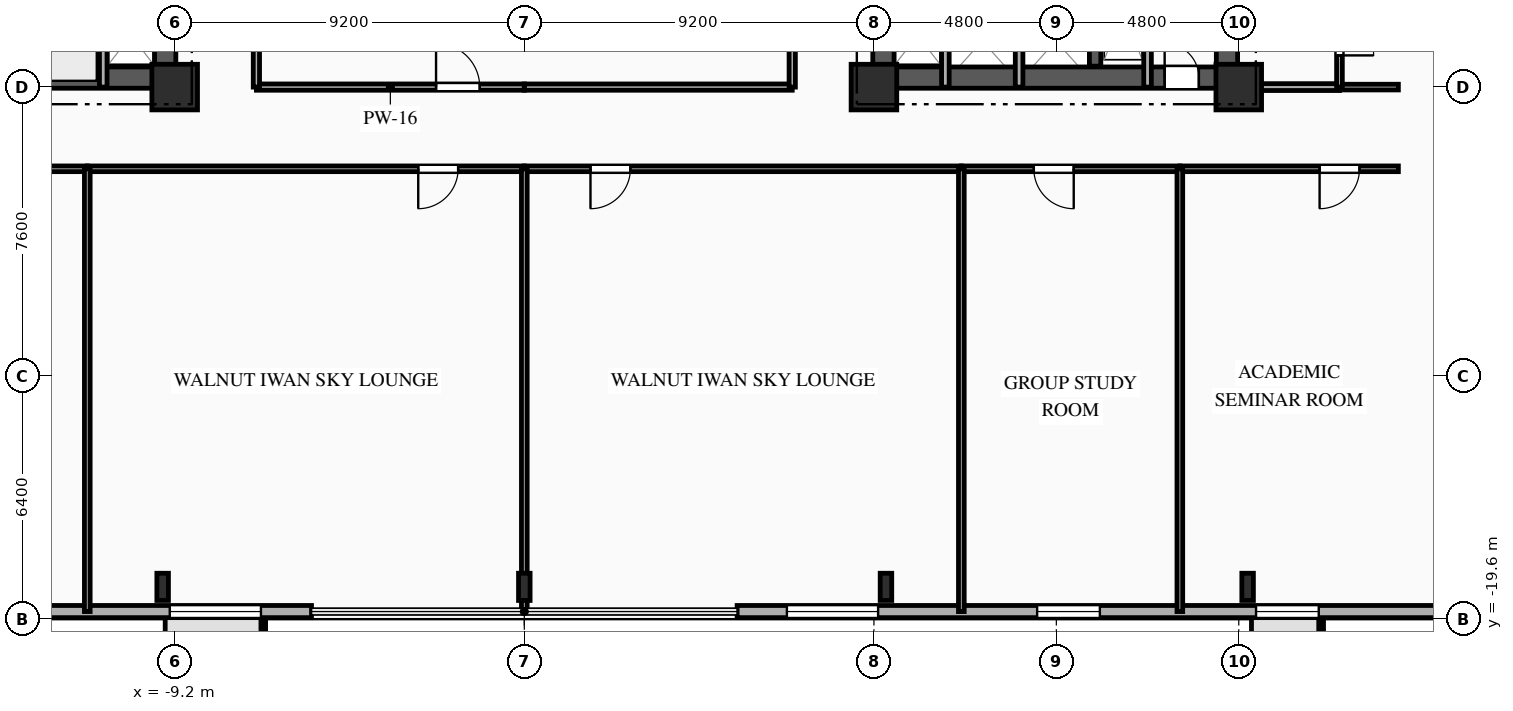
"""IFC4 building model, lengths in metres.
Left out: names, types, materials, properties, quantities, classifications, styles, units other than length and angle.
Written with IfcOpenShell. Run it as: python <this file> out.ifc"""

import sys

from ifc_helpers import new_model, si_unit, direction, frame, frame_2d, origin, origin_2d, place, context, subcontext, project, spatial, rectangle, i_section, extrude, element, fill, save


model = new_model("IFC4")
c1 = context("Model", 3, precision=1e-05, world=origin(), true_north=direction((0.0, 1.0)))
c2 = subcontext(c1, "Body", "Model", "MODEL_VIEW")
j1 = project(units=[si_unit("LENGTHUNIT", "METRE"), si_unit("PLANEANGLEUNIT", "RADIAN")], contexts=[c1])
p1 = place(None, origin())
s1 = spatial("IfcSite", under=j1, at=p1, CompositionType="ELEMENT")
p2 = place(p1, origin())
s2 = spatial("IfcBuilding", under=s1, at=p2, CompositionType="ELEMENT")
p3 = place(p2, frame((0.0, 0.0, 50.45)))
s3 = spatial("IfcBuildingStorey", under=s2, at=p3, CompositionType="ELEMENT", Elevation=50.45)
for number, where, z_axis, x_axis in (
    (1, (-9.2, -5.6, 0.0), (0.0, 0.0, 1.0), (1.0, 0.0, 0.0)),
    (2, (9.2, -5.6, 0.0), (0.0, 0.0, 1.0), (1.0, 0.0, 0.0)),
    (3, (18.8, -5.6, 0.0), (0.0, 0.0, 1.0), (1.0, 0.0, 0.0)),
):
    element("IfcColumn", number, at=place(p3, frame(where, z_axis=z_axis, x_axis=x_axis)), inside=s3, PredefinedType="COLUMN", context=c2, shape_type="SweptSolid", body=[
        extrude(rectangle(XDim=1.2, YDim=1.2, at=origin_2d()), origin(), (0.0, 0.0, 1.0), 3.35),
    ])
for number, where, z_axis, x_axis in (
    (4, (-9.517, -18.75, 0.0), (0.0, 0.0, 1.0), (1.0, 0.0, 0.0)),
    (5, (0.0, -18.75, 0.0), (0.0, 0.0, 1.0), (1.0, 0.0, 0.0)),
    (6, (9.517, -18.75, 0.0), (0.0, 0.0, 1.0), (1.0, 0.0, 0.0)),
    (7, (19.033, -18.75, 0.0), (0.0, 0.0, 1.0), (1.0, 0.0, 0.0)),
):
    element("IfcColumn", number, at=place(p3, frame(where, z_axis=z_axis, x_axis=x_axis)), inside=s3, PredefinedType="COLUMN", context=c2, shape_type="SweptSolid", body=[
        extrude(i_section(OverallWidth=0.304, OverallDepth=0.716, WebThickness=0.021, FlangeThickness=0.04, FilletRadius=0.027, at=origin_2d()), origin(), (0.0, 0.0, 1.0), 3.35),
    ])
p4 = place(p3, frame((29.2, -19.4, 0.0), z_axis=(0.0, 0.0, 1.0), x_axis=(-1.0, 0.0, 0.0)))
e8 = element("IfcWall", 8, at=p4, inside=s3, PredefinedType="SOLIDWALL", context=c2, shape_type="SweptSolid", body=[
    extrude(rectangle(XDim=23.6, YDim=0.32, at=frame_2d((11.8, 0.0))), origin(), (0.0, 0.0, 1.0), 3.035),
])
p5 = place(p4, frame((8.295, 0.0, 0.85)))
e9 = element("IfcOpeningElement", 9, at=p5, cuts=e8, PredefinedType="OPENING", context=c2, shape_type="SweptSolid", body=[
    extrude(rectangle(XDim=1.65, YDim=1.85, at=frame_2d((0.825, 0.925))), frame((0.0, 0.17, 0.0), z_axis=(0.0, -1.0, 0.0), x_axis=(1.0, 0.0, 0.0)), (0.0, 0.0, 1.0), 0.34),
])
p6 = place(p4, frame((14.055, 0.0, 0.85)))
e10 = element("IfcOpeningElement", 10, at=p6, cuts=e8, PredefinedType="OPENING", context=c2, shape_type="SweptSolid", body=[
    extrude(rectangle(XDim=1.65, YDim=1.85, at=frame_2d((0.825, 0.925))), frame((0.0, 0.17, 0.0), z_axis=(0.0, -1.0, 0.0), x_axis=(1.0, 0.0, 0.0)), (0.0, 0.0, 1.0), 0.34),
])
p7 = place(p4, frame((19.89, 0.0, 0.85)))
e11 = element("IfcOpeningElement", 11, at=p7, cuts=e8, PredefinedType="OPENING", context=c2, shape_type="SweptSolid", body=[
    extrude(rectangle(XDim=2.4, YDim=1.95, at=frame_2d((1.2, 0.975))), frame((0.0, 0.17, 0.0), z_axis=(0.0, -1.0, 0.0), x_axis=(1.0, 0.0, 0.0)), (0.0, 0.0, 1.0), 0.34),
])
p8 = place(p3, frame((-5.6, -19.4, 0.0), z_axis=(0.0, 0.0, 1.0), x_axis=(-1.0, 0.0, 0.0)))
e12 = element("IfcWall", 12, at=p8, inside=s3, PredefinedType="SOLIDWALL", context=c2, shape_type="SweptSolid", body=[
    extrude(rectangle(XDim=23.6, YDim=0.32, at=frame_2d((11.8, 0.0))), origin(), (0.0, 0.0, 1.0), 3.035),
])
p9 = place(p8, frame((1.33, 0.0, 0.85)))
e13 = element("IfcOpeningElement", 13, at=p9, cuts=e12, PredefinedType="OPENING", context=c2, shape_type="SweptSolid", body=[
    extrude(rectangle(XDim=2.4, YDim=1.95, at=frame_2d((1.2, 0.975))), frame((0.0, 0.17, 0.0), z_axis=(0.0, -1.0, 0.0), x_axis=(1.0, 0.0, 0.0)), (0.0, 0.0, 1.0), 0.34),
])
p10 = place(p8, frame((7.975, 0.0, 0.85)))
e14 = element("IfcOpeningElement", 14, at=p10, cuts=e12, PredefinedType="OPENING", context=c2, shape_type="SweptSolid", body=[
    extrude(rectangle(XDim=1.65, YDim=1.85, at=frame_2d((0.825, 0.925))), frame((0.0, 0.17, 0.0), z_axis=(0.0, -1.0, 0.0), x_axis=(1.0, 0.0, 0.0)), (0.0, 0.0, 1.0), 0.34),
])
p11 = place(p8, frame((13.735, 0.0, 0.85)))
e15 = element("IfcOpeningElement", 15, at=p11, cuts=e12, PredefinedType="OPENING", context=c2, shape_type="SweptSolid", body=[
    extrude(rectangle(XDim=1.65, YDim=1.85, at=frame_2d((0.825, 0.925))), frame((0.0, 0.17, 0.0), z_axis=(0.0, -1.0, 0.0), x_axis=(1.0, 0.0, 0.0)), (0.0, 0.0, 1.0), 0.34),
])
p12 = place(p3, frame((-18.8, -5.35, 0.0), z_axis=(0.0, 0.0, 1.0), x_axis=(1.0, 0.0, 0.0)))
e16 = element("IfcWall", 16, at=p12, inside=s3, PredefinedType="SHEAR", context=c2, shape_type="SweptSolid", body=[
    extrude(rectangle(XDim=9.6, YDim=0.56, at=frame_2d((4.8, 0.0))), origin(), (0.0, 0.0, 1.0), 3.035),
])
p13 = place(p12, frame((1.05, 0.0, 0.0)))
e17 = element("IfcOpeningElement", 17, at=p13, cuts=e16, PredefinedType="OPENING", context=c2, shape_type="SweptSolid", body=[
    extrude(rectangle(XDim=0.9, YDim=2.1, at=frame_2d((0.45, 1.05))), frame((0.0, 0.29, 0.0), z_axis=(0.0, -1.0, 0.0), x_axis=(1.0, 0.0, 0.0)), (0.0, 0.0, 1.0), 0.58),
])
p14 = place(p3, frame((-9.45, -5.05, 0.0), z_axis=(0.0, 0.0, 1.0), x_axis=(0.0, 1.0, 0.0)))
e18 = element("IfcWall", 18, at=p14, inside=s3, PredefinedType="SHEAR", context=c2, shape_type="SweptSolid", body=[
    extrude(rectangle(XDim=10.1, YDim=0.56, at=frame_2d((5.05, 0.0))), origin(), (0.0, 0.0, 1.0), 3.035),
])
p15 = place(p14, frame((7.15, 0.0, 0.0)))
e19 = element("IfcOpeningElement", 19, at=p15, cuts=e18, PredefinedType="OPENING", context=c2, shape_type="SweptSolid", body=[
    extrude(rectangle(XDim=0.9, YDim=2.1, at=frame_2d((0.45, 1.05))), frame((0.0, 0.29, 0.0), z_axis=(0.0, -1.0, 0.0), x_axis=(1.0, 0.0, 0.0)), (0.0, 0.0, 1.0), 0.58),
])
p16 = place(p14, frame((2.4, 0.0, 0.0)))
e20 = element("IfcOpeningElement", 20, at=p16, cuts=e18, PredefinedType="OPENING", context=c2, shape_type="SweptSolid", body=[
    extrude(rectangle(XDim=1.2, YDim=2.15, at=frame_2d((0.6, 1.075))), frame((0.0, 0.29, 0.0), z_axis=(0.0, -1.0, 0.0), x_axis=(1.0, 0.0, 0.0)), (0.0, 0.0, 1.0), 0.58),
])
p17 = place(p3, frame((9.2, -5.35, 0.0), z_axis=(0.0, 0.0, 1.0), x_axis=(1.0, 0.0, 0.0)))
e21 = element("IfcWall", 21, at=p17, inside=s3, PredefinedType="SHEAR", context=c2, shape_type="SweptSolid", body=[
    extrude(rectangle(XDim=9.6, YDim=0.56, at=frame_2d((4.8, 0.0))), origin(), (0.0, 0.0, 1.0), 3.035),
])
p18 = place(p17, frame((7.65, 0.0, 0.0)))
e22 = element("IfcOpeningElement", 22, at=p18, cuts=e21, PredefinedType="OPENING", context=c2, shape_type="SweptSolid", body=[
    extrude(rectangle(XDim=0.9, YDim=2.1, at=frame_2d((0.45, 1.05))), frame((0.0, 0.29, 0.0), z_axis=(0.0, -1.0, 0.0), x_axis=(1.0, 0.0, 0.0)), (0.0, 0.0, 1.0), 0.58),
])
p19 = place(p3, frame((9.45, -5.05, 0.0), z_axis=(0.0, 0.0, 1.0), x_axis=(0.0, 1.0, 0.0)))
e23 = element("IfcWall", 23, at=p19, inside=s3, PredefinedType="SHEAR", context=c2, shape_type="SweptSolid", body=[
    extrude(rectangle(XDim=10.1, YDim=0.56, at=frame_2d((5.05, 0.0))), origin(), (0.0, 0.0, 1.0), 3.035),
])
p20 = place(p19, frame((7.15, 0.0, 0.0)))
e24 = element("IfcOpeningElement", 24, at=p20, cuts=e23, PredefinedType="OPENING", context=c2, shape_type="SweptSolid", body=[
    extrude(rectangle(XDim=0.9, YDim=2.1, at=frame_2d((0.45, 1.05))), frame((0.0, 0.29, 0.0), z_axis=(0.0, -1.0, 0.0), x_axis=(1.0, 0.0, 0.0)), (0.0, 0.0, 1.0), 0.58),
])
p21 = place(p19, frame((2.4, 0.0, 0.0)))
e25 = element("IfcOpeningElement", 25, at=p21, cuts=e23, PredefinedType="OPENING", context=c2, shape_type="SweptSolid", body=[
    extrude(rectangle(XDim=1.2, YDim=2.15, at=frame_2d((0.6, 1.075))), frame((0.0, 0.29, 0.0), z_axis=(0.0, -1.0, 0.0), x_axis=(1.0, 0.0, 0.0)), (0.0, 0.0, 1.0), 0.58),
])
p22 = place(p3, frame((18.49, -5.05, 0.0), z_axis=(0.0, 0.0, 1.0), x_axis=(0.0, 1.0, 0.0)))
e26 = element("IfcWall", 26, at=p22, inside=s3, PredefinedType="SHEAR", context=c2, shape_type="SweptSolid", body=[
    extrude(rectangle(XDim=10.1, YDim=0.56, at=frame_2d((5.05, 0.0))), origin(), (0.0, 0.0, 1.0), 3.035),
])
p23 = place(p3, frame((15.02, -5.05, 0.0), z_axis=(0.0, 0.0, 1.0), x_axis=(0.0, 1.0, 0.0)))
e27 = element("IfcWall", 27, at=p23, inside=s3, PredefinedType="SHEAR", context=c2, shape_type="SweptSolid", body=[
    extrude(rectangle(XDim=10.1, YDim=0.3, at=frame_2d((5.05, 0.0))), origin(), (0.0, 0.0, 1.0), 3.035),
])
p24 = place(p3, frame((-11.08, -5.6, 0.0), z_axis=(0.0, 0.0, 1.0), x_axis=(0.0, 1.0, 0.0)))
e28 = element("IfcWall", 28, at=p24, inside=s3, PredefinedType="PARTITIONING", context=c2, shape_type="SweptSolid", body=[
    extrude(rectangle(XDim=2.25, YDim=0.2, at=frame_2d((1.125, 0.0))), origin(), (0.0, 0.0, 1.0), 3.035),
])
p25 = place(p3, frame((16.4, -2.11, 0.0), z_axis=(0.0, 0.0, 1.0), x_axis=(0.0, -1.0, 0.0)))
e29 = element("IfcWall", 29, at=p25, inside=s3, PredefinedType="PARTITIONING", context=c2, shape_type="SweptSolid", body=[
    extrude(rectangle(XDim=3.49, YDim=0.2, at=frame_2d((1.745, 0.0))), origin(), (0.0, 0.0, 1.0), 3.035),
])
for number, where, z_axis, x_axis in (
    (30, (11.08, -5.6, 0.0), (0.0, 0.0, 1.0), (0.0, 1.0, 0.0)),
    (31, (13.02, -5.6, 0.0), (0.0, 0.0, 1.0), (0.0, 1.0, 0.0)),
):
    element("IfcWall", number, at=place(p3, frame(where, z_axis=z_axis, x_axis=x_axis)), inside=s3, PredefinedType="PARTITIONING", context=c2, shape_type="SweptSolid", body=[
        extrude(rectangle(XDim=2.25, YDim=0.2, at=frame_2d((1.125, 0.0))), origin(), (0.0, 0.0, 1.0), 3.035),
    ])
p26 = place(p3, frame((-11.5, -7.75, 0.0), z_axis=(0.0, 0.0, 1.0), x_axis=(-1.0, 0.0, 0.0)))
e32 = element("IfcWall", 32, at=p26, inside=s3, PredefinedType="PARTITIONING", context=c2, shape_type="SweptSolid", body=[
    extrude(rectangle(XDim=5.75, YDim=0.15, at=frame_2d((2.875, 0.0))), origin(), (0.0, 0.0, 1.0), 3.035),
])
p27 = place(p26, frame((1.907, 0.0, 0.0)))
e33 = element("IfcOpeningElement", 33, at=p27, cuts=e32, PredefinedType="OPENING", context=c2, shape_type="SweptSolid", body=[
    extrude(rectangle(XDim=1.05, YDim=2.15, at=frame_2d((0.525, 1.075))), frame((0.0, 0.085, 0.0), z_axis=(0.0, -1.0, 0.0), x_axis=(1.0, 0.0, 0.0)), (0.0, 0.0, 1.0), 0.17),
])
p28 = place(p3, frame((0.0, -7.75, 0.0), z_axis=(0.0, 0.0, 1.0), x_axis=(-1.0, 0.0, 0.0)))
e34 = element("IfcWall", 34, at=p28, inside=s3, PredefinedType="PARTITIONING", context=c2, shape_type="SweptSolid", body=[
    extrude(rectangle(XDim=11.5, YDim=0.15, at=frame_2d((5.75, 0.0))), origin(), (0.0, 0.0, 1.0), 3.035),
])
p29 = place(p28, frame((1.741, 0.0, 0.0)))
e35 = element("IfcOpeningElement", 35, at=p29, cuts=e34, PredefinedType="OPENING", context=c2, shape_type="SweptSolid", body=[
    extrude(rectangle(XDim=1.05, YDim=2.15, at=frame_2d((0.525, 1.075))), frame((0.0, 0.085, 0.0), z_axis=(0.0, -1.0, 0.0), x_axis=(1.0, 0.0, 0.0)), (0.0, 0.0, 1.0), 0.17),
])
p30 = place(p3, frame((-7.05, -5.6, 0.0), z_axis=(0.0, 0.0, 1.0), x_axis=(1.0, 0.0, 0.0)))
e36 = element("IfcWall", 36, at=p30, inside=s3, PredefinedType="PARTITIONING", context=c2, shape_type="SweptSolid", body=[
    extrude(rectangle(XDim=7.05, YDim=0.165, at=frame_2d((3.525, 0.0))), origin(), (0.0, 0.0, 1.0), 2.52),
])
p31 = place(p30, frame((4.728, 0.0, 0.0)))
e37 = element("IfcOpeningElement", 37, at=p31, cuts=e36, PredefinedType="OPENING", context=c2, shape_type="SweptSolid", body=[
    extrude(rectangle(XDim=1.15, YDim=2.15, at=frame_2d((0.575, 1.075))), frame((0.0, 0.093, 0.0), z_axis=(0.0, -1.0, 0.0), x_axis=(1.0, 0.0, 0.0)), (0.0, 0.0, 1.0), 0.185),
])
p32 = place(p3, frame((18.8, -5.6, 0.0), z_axis=(0.0, 0.0, 1.0), x_axis=(1.0, 0.0, 0.0)))
e38 = element("IfcWall", 38, at=p32, inside=s3, PredefinedType="PARTITIONING", context=c2, shape_type="SweptSolid", body=[
    extrude(rectangle(XDim=2.65, YDim=0.18, at=frame_2d((1.325, 0.0))), origin(), (0.0, 0.0, 1.0), 3.035),
])
p33 = place(p3, frame((21.45, -5.6, 0.0), z_axis=(0.0, 0.0, 1.0), x_axis=(1.0, 0.0, 0.0)))
e39 = element("IfcWall", 39, at=p33, inside=s3, PredefinedType="PLUMBINGWALL", context=c2, shape_type="SweptSolid", body=[
    extrude(rectangle(XDim=1.55, YDim=0.15, at=frame_2d((0.775, 0.0))), origin(), (0.0, 0.0, 1.0), 3.035),
])
p34 = place(p3, frame((11.5, -7.75, 0.0), z_axis=(0.0, 0.0, 1.0), x_axis=(-1.0, 0.0, 0.0)))
e40 = element("IfcWall", 40, at=p34, inside=s3, PredefinedType="PARTITIONING", context=c2, shape_type="SweptSolid", body=[
    extrude(rectangle(XDim=11.5, YDim=0.15, at=frame_2d((5.75, 0.0))), origin(), (0.0, 0.0, 1.0), 3.035),
])
p35 = place(p34, frame((8.709, 0.0, 0.0)))
e41 = element("IfcOpeningElement", 41, at=p35, cuts=e40, PredefinedType="OPENING", context=c2, shape_type="SweptSolid", body=[
    extrude(rectangle(XDim=1.05, YDim=2.15, at=frame_2d((0.525, 1.075))), frame((0.0, 0.085, 0.0), z_axis=(0.0, -1.0, 0.0), x_axis=(1.0, 0.0, 0.0)), (0.0, 0.0, 1.0), 0.17),
])
p36 = place(p3, frame((17.25, -7.75, 0.0), z_axis=(0.0, 0.0, 1.0), x_axis=(-1.0, 0.0, 0.0)))
e42 = element("IfcWall", 42, at=p36, inside=s3, PredefinedType="PARTITIONING", context=c2, shape_type="SweptSolid", body=[
    extrude(rectangle(XDim=5.75, YDim=0.15, at=frame_2d((2.875, 0.0))), origin(), (0.0, 0.0, 1.0), 3.035),
])
p37 = place(p36, frame((2.792, 0.0, 0.0)))
e43 = element("IfcOpeningElement", 43, at=p37, cuts=e42, PredefinedType="OPENING", context=c2, shape_type="SweptSolid", body=[
    extrude(rectangle(XDim=1.05, YDim=2.15, at=frame_2d((0.525, 1.075))), frame((0.0, 0.085, 0.0), z_axis=(0.0, -1.0, 0.0), x_axis=(1.0, 0.0, 0.0)), (0.0, 0.0, 1.0), 0.17),
])
p38 = place(p3, frame((23.0, -7.75, 0.0), z_axis=(0.0, 0.0, 1.0), x_axis=(-1.0, 0.0, 0.0)))
e44 = element("IfcWall", 44, at=p38, inside=s3, PredefinedType="PARTITIONING", context=c2, shape_type="SweptSolid", body=[
    extrude(rectangle(XDim=5.75, YDim=0.15, at=frame_2d((2.875, 0.0))), origin(), (0.0, 0.0, 1.0), 3.035),
])
p39 = place(p38, frame((1.022, 0.0, 0.0)))
e45 = element("IfcOpeningElement", 45, at=p39, cuts=e44, PredefinedType="OPENING", context=c2, shape_type="SweptSolid", body=[
    extrude(rectangle(XDim=1.05, YDim=2.15, at=frame_2d((0.525, 1.075))), frame((0.0, 0.085, 0.0), z_axis=(0.0, -1.0, 0.0), x_axis=(1.0, 0.0, 0.0)), (0.0, 0.0, 1.0), 0.17),
])
p40 = place(p3, frame((0.0, -5.6, 0.0), z_axis=(0.0, 0.0, 1.0), x_axis=(1.0, 0.0, 0.0)))
e46 = element("IfcWall", 46, at=p40, inside=s3, PredefinedType="PARTITIONING", context=c2, shape_type="SweptSolid", body=[
    extrude(rectangle(XDim=7.05, YDim=0.165, at=frame_2d((3.525, 0.0))), origin(), (0.0, 0.0, 1.0), 2.52),
])
for number, where, z_axis, x_axis in (
    (47, (-7.05, 1.45, 0.0), (0.0, 0.0, 1.0), (0.0, -1.0, 0.0)),
    (48, (7.05, -5.6, 0.0), (0.0, 0.0, 1.0), (0.0, 1.0, 0.0)),
):
    element("IfcWall", number, at=place(p3, frame(where, z_axis=z_axis, x_axis=x_axis)), inside=s3, PredefinedType="PARTITIONING", context=c2, shape_type="SweptSolid", body=[
        extrude(rectangle(XDim=7.05, YDim=0.165, at=frame_2d((3.525, 0.0))), origin(), (0.0, 0.0, 1.0), 3.035),
    ])
p41 = place(p3, frame((21.45, -3.25, 0.0), z_axis=(0.0, 0.0, 1.0), x_axis=(0.0, -1.0, 0.0)))
e49 = element("IfcWall", 49, at=p41, inside=s3, PredefinedType="PLUMBINGWALL", context=c2, shape_type="SweptSolid", body=[
    extrude(rectangle(XDim=2.35, YDim=0.15, at=frame_2d((1.175, 0.0))), origin(), (0.0, 0.0, 1.0), 3.035),
])
p42 = place(p41, frame((0.616, 0.0, 0.0)))
e50 = element("IfcOpeningElement", 50, at=p42, cuts=e49, PredefinedType="OPENING", context=c2, shape_type="SweptSolid", body=[
    extrude(rectangle(XDim=0.9, YDim=2.1, at=frame_2d((0.45, 1.05))), frame((0.0, 0.085, 0.0), z_axis=(0.0, -1.0, 0.0), x_axis=(1.0, 0.0, 0.0)), (0.0, 0.0, 1.0), 0.17),
])
for number, where, z_axis, x_axis in (
    (51, (-11.5, -7.75, 0.0), (0.0, 0.0, 1.0), (0.0, -1.0, 0.0)),
    (52, (0.0, -7.75, 0.0), (0.0, 0.0, 1.0), (0.0, -1.0, 0.0)),
    (53, (11.5, -7.75, 0.0), (0.0, 0.0, 1.0), (0.0, -1.0, 0.0)),
    (54, (17.25, -7.75, 0.0), (0.0, 0.0, 1.0), (0.0, -1.0, 0.0)),
):
    element("IfcWall", number, at=place(p3, frame(where, z_axis=z_axis, x_axis=x_axis)), inside=s3, PredefinedType="PARTITIONING", context=c2, shape_type="SweptSolid", body=[
        extrude(rectangle(XDim=11.65, YDim=0.15, at=frame_2d((5.825, 0.0))), origin(), (0.0, 0.0, 1.0), 3.035),
    ])
p43 = place(p5, origin())
e55 = element("IfcWindow", 55, at=p43, inside=s3, PartitioningType="SINGLE_PANEL", PredefinedType="WINDOW", context=c2, shape_type="SweptSolid", body=[
    extrude(rectangle(XDim=1.65, YDim=1.85, at=frame_2d((0.825, 0.925))), frame((0.0, 0.03, 0.0), z_axis=(0.0, -1.0, 0.0), x_axis=(1.0, 0.0, 0.0)), (0.0, 0.0, 1.0), 0.06),
])
fill(e9, e55)
p44 = place(p6, origin())
e56 = element("IfcWindow", 56, at=p44, inside=s3, PartitioningType="SINGLE_PANEL", PredefinedType="WINDOW", context=c2, shape_type="SweptSolid", body=[
    extrude(rectangle(XDim=1.65, YDim=1.85, at=frame_2d((0.825, 0.925))), frame((0.0, 0.03, 0.0), z_axis=(0.0, -1.0, 0.0), x_axis=(1.0, 0.0, 0.0)), (0.0, 0.0, 1.0), 0.06),
])
fill(e10, e56)
p45 = place(p7, origin())
e57 = element("IfcWindow", 57, at=p45, inside=s3, PartitioningType="SINGLE_PANEL", PredefinedType="WINDOW", context=c2, shape_type="SweptSolid", body=[
    extrude(rectangle(XDim=2.4, YDim=1.95, at=frame_2d((1.2, 0.975))), frame((0.0, 0.03, 0.0), z_axis=(0.0, -1.0, 0.0), x_axis=(1.0, 0.0, 0.0)), (0.0, 0.0, 1.0), 0.06),
])
fill(e11, e57)
p46 = place(p9, origin())
e58 = element("IfcWindow", 58, at=p46, inside=s3, PartitioningType="SINGLE_PANEL", PredefinedType="WINDOW", context=c2, shape_type="SweptSolid", body=[
    extrude(rectangle(XDim=2.4, YDim=1.95, at=frame_2d((1.2, 0.975))), frame((0.0, 0.03, 0.0), z_axis=(0.0, -1.0, 0.0), x_axis=(1.0, 0.0, 0.0)), (0.0, 0.0, 1.0), 0.06),
])
fill(e13, e58)
p47 = place(p18, origin())
e59 = element("IfcDoor", 59, at=p47, inside=s3, OperationType="SINGLE_SWING_LEFT", PredefinedType="DOOR", context=c2, shape_type="SweptSolid", body=[
    extrude(rectangle(XDim=0.9, YDim=2.1, at=frame_2d((0.45, 1.05))), frame((0.0, 0.025, 0.0), z_axis=(0.0, -1.0, 0.0), x_axis=(1.0, 0.0, 0.0)), (0.0, 0.0, 1.0), 0.05),
])
fill(e22, e59)
p48 = place(p29, origin())
e60 = element("IfcDoor", 60, at=p48, inside=s3, OperationType="SINGLE_SWING_RIGHT", PredefinedType="DOOR", context=c2, shape_type="SweptSolid", body=[
    extrude(rectangle(XDim=1.05, YDim=2.15, at=frame_2d((0.525, 1.075))), frame((0.0, 0.025, 0.0), z_axis=(0.0, -1.0, 0.0), x_axis=(1.0, 0.0, 0.0)), (0.0, 0.0, 1.0), 0.05),
])
fill(e35, e60)
p49 = place(p31, origin())
e61 = element("IfcDoor", 61, at=p49, inside=s3, OperationType="SINGLE_SWING_LEFT", PredefinedType="DOOR", context=c2, shape_type="SweptSolid", body=[
    extrude(rectangle(XDim=1.15, YDim=2.15, at=frame_2d((0.575, 1.075))), frame((0.0, 0.025, 0.0), z_axis=(0.0, -1.0, 0.0), x_axis=(1.0, 0.0, 0.0)), (0.0, 0.0, 1.0), 0.05),
])
fill(e37, e61)
p50 = place(p35, origin())
e62 = element("IfcDoor", 62, at=p50, inside=s3, OperationType="SINGLE_SWING_RIGHT", PredefinedType="DOOR", context=c2, shape_type="SweptSolid", body=[
    extrude(rectangle(XDim=1.05, YDim=2.15, at=frame_2d((0.525, 1.075))), frame((0.0, 0.025, 0.0), z_axis=(0.0, -1.0, 0.0), x_axis=(1.0, 0.0, 0.0)), (0.0, 0.0, 1.0), 0.05),
])
fill(e41, e62)
p51 = place(p37, origin())
e63 = element("IfcDoor", 63, at=p51, inside=s3, OperationType="SINGLE_SWING_LEFT", PredefinedType="DOOR", context=c2, shape_type="SweptSolid", body=[
    extrude(rectangle(XDim=1.05, YDim=2.15, at=frame_2d((0.525, 1.075))), frame((0.0, 0.025, 0.0), z_axis=(0.0, -1.0, 0.0), x_axis=(1.0, 0.0, 0.0)), (0.0, 0.0, 1.0), 0.05),
])
fill(e43, e63)
p52 = place(p39, origin())
e64 = element("IfcDoor", 64, at=p52, inside=s3, OperationType="SINGLE_SWING_RIGHT", PredefinedType="DOOR", context=c2, shape_type="SweptSolid", body=[
    extrude(rectangle(XDim=1.05, YDim=2.15, at=frame_2d((0.525, 1.075))), frame((0.0, 0.025, 0.0), z_axis=(0.0, -1.0, 0.0), x_axis=(1.0, 0.0, 0.0)), (0.0, 0.0, 1.0), 0.05),
])
fill(e45, e64)
p53 = place(p42, origin())
e65 = element("IfcDoor", 65, at=p53, inside=s3, OperationType="SINGLE_SWING_RIGHT", PredefinedType="DOOR", context=c2, shape_type="SweptSolid", body=[
    extrude(rectangle(XDim=0.9, YDim=2.1, at=frame_2d((0.45, 1.05))), frame((0.0, 0.025, 0.0), z_axis=(0.0, -1.0, 0.0), x_axis=(1.0, 0.0, 0.0)), (0.0, 0.0, 1.0), 0.05),
])
fill(e50, e65)
save(model, sys.argv[1])
